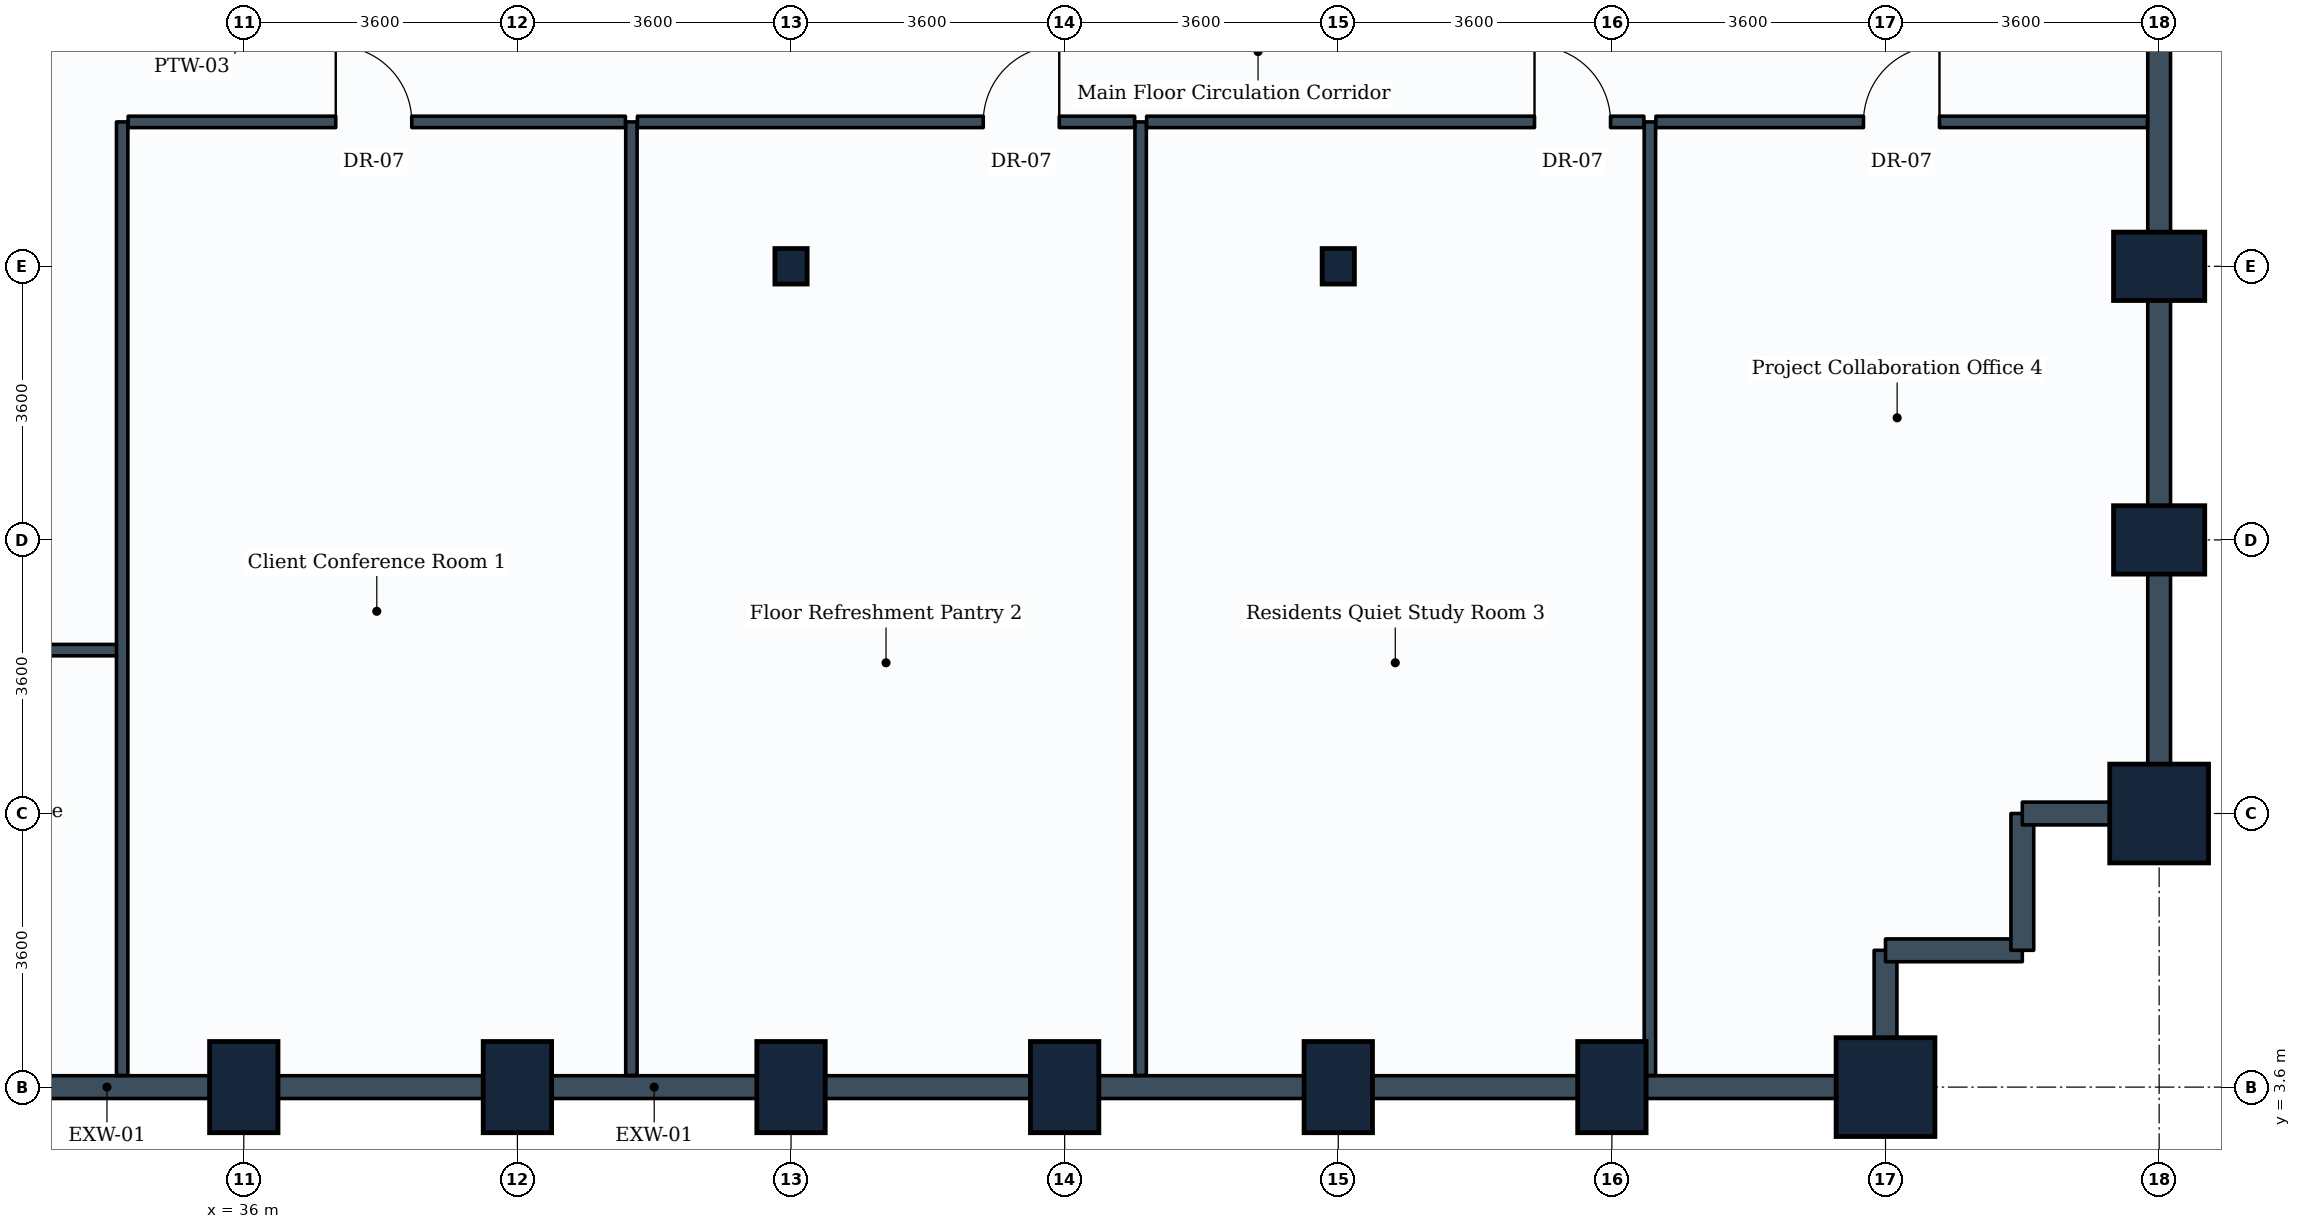
"""IFC4 building model, lengths in metres.
Left out: names, types, materials, properties, quantities, classifications, styles, units other than length and angle.
Written with IfcOpenShell. Run it as: python <this file> out.ifc"""

import sys

from ifc_helpers import new_model, si_unit, direction, frame, frame_2d, origin, origin_2d, place, context, subcontext, project, spatial, rectangle, i_section, extrude, element, fill, save


model = new_model("IFC4")
c1 = context("Model", 3, precision=1e-05, world=origin(), true_north=direction((0.0, 1.0)))
c2 = subcontext(c1, "Body", "Model", "MODEL_VIEW")
j1 = project(units=[si_unit("LENGTHUNIT", "METRE"), si_unit("PLANEANGLEUNIT", "RADIAN")], contexts=[c1])
p1 = place(None, origin())
s1 = spatial("IfcSite", under=j1, at=p1, CompositionType="ELEMENT")
p2 = place(p1, origin())
s2 = spatial("IfcBuilding", under=s1, at=p2, CompositionType="ELEMENT")
p3 = place(p2, frame((0.0, 0.0, 43.5)))
s3 = spatial("IfcBuildingStorey", under=s2, at=p3, CompositionType="ELEMENT", Elevation=43.5)
for number, where, z_axis, x_axis in (
    (1, (36.0, 3.6, 0.0), (0.0, 0.0, 1.0), (1.0, 0.0, 0.0)),
    (2, (39.6, 3.6, 0.0), (0.0, 0.0, 1.0), (1.0, 0.0, 0.0)),
    (3, (43.2, 3.6, 0.0), (0.0, 0.0, 1.0), (1.0, 0.0, 0.0)),
):
    element("IfcColumn", number, at=place(p3, frame(where, z_axis=z_axis, x_axis=x_axis)), inside=s3, PredefinedType="COLUMN", context=c2, shape_type="SweptSolid", body=[
        extrude(rectangle(XDim=0.9, YDim=1.2, at=origin_2d()), origin(), (0.0, 0.0, 1.0), 3.9),
    ])
p4 = place(p3, frame((43.2, 14.4, 0.0), z_axis=(0.0, 0.0, 1.0), x_axis=(1.0, 0.0, 0.0)))
e4 = element("IfcColumn", 4, at=p4, inside=s3, PredefinedType="COLUMN", context=c2, shape_type="SweptSolid", body=[
    extrude(i_section(OverallWidth=0.424, OverallDepth=0.467, WebThickness=0.033, FlangeThickness=0.053, FilletRadius=0.015, at=origin_2d()), origin(), (0.0, 0.0, 1.0), 3.9),
])
for number, where, z_axis, x_axis in (
    (5, (46.8, 3.6, 0.0), (0.0, 0.0, 1.0), (1.0, 0.0, 0.0)),
    (6, (50.4, 3.6, 0.0), (0.0, 0.0, 1.0), (1.0, 0.0, 0.0)),
):
    element("IfcColumn", number, at=place(p3, frame(where, z_axis=z_axis, x_axis=x_axis)), inside=s3, PredefinedType="COLUMN", context=c2, shape_type="SweptSolid", body=[
        extrude(rectangle(XDim=0.9, YDim=1.2, at=origin_2d()), origin(), (0.0, 0.0, 1.0), 3.9),
    ])
p5 = place(p3, frame((50.4, 14.4, 0.0), z_axis=(0.0, 0.0, 1.0), x_axis=(1.0, 0.0, 0.0)))
e7 = element("IfcColumn", 7, at=p5, inside=s3, PredefinedType="COLUMN", context=c2, shape_type="SweptSolid", body=[
    extrude(i_section(OverallWidth=0.424, OverallDepth=0.467, WebThickness=0.033, FlangeThickness=0.053, FilletRadius=0.015, at=origin_2d()), origin(), (0.0, 0.0, 1.0), 3.9),
])
p6 = place(p3, frame((54.0, 3.6, 0.0), z_axis=(0.0, 0.0, 1.0), x_axis=(1.0, 0.0, 0.0)))
e8 = element("IfcColumn", 8, at=p6, inside=s3, PredefinedType="COLUMN", context=c2, shape_type="SweptSolid", body=[
    extrude(rectangle(XDim=0.9, YDim=1.2, at=origin_2d()), origin(), (0.0, 0.0, 1.0), 3.9),
])
for number, where, z_axis, x_axis in (
    (9, (57.6, 3.6, 0.0), (0.0, 0.0, 1.0), (1.0, 0.0, 0.0)),
    (10, (61.2, 7.2, 0.0), (0.0, 0.0, 1.0), (1.0, 0.0, 0.0)),
):
    element("IfcColumn", number, at=place(p3, frame(where, z_axis=z_axis, x_axis=x_axis)), inside=s3, PredefinedType="COLUMN", context=c2, shape_type="SweptSolid", body=[
        extrude(rectangle(XDim=1.3, YDim=1.3, at=origin_2d()), origin(), (0.0, 0.0, 1.0), 3.9),
    ])
for number, where, z_axis, x_axis in (
    (11, (61.2, 10.8, 0.0), (0.0, 0.0, 1.0), (0.0, 1.0, 0.0)),
    (12, (61.2, 14.4, 0.0), (0.0, 0.0, 1.0), (0.0, 1.0, 0.0)),
):
    element("IfcColumn", number, at=place(p3, frame(where, z_axis=z_axis, x_axis=x_axis)), inside=s3, PredefinedType="COLUMN", context=c2, shape_type="SweptSolid", body=[
        extrude(rectangle(XDim=0.9, YDim=1.2, at=origin_2d()), origin(), (0.0, 0.0, 1.0), 3.9),
    ])
for number, where, z_axis, x_axis in (
    (13, (36.0, 3.6, 0.0), (0.0, 0.0, 1.0), (-1.0, 0.0, 0.0)),
    (14, (39.6, 3.6, 0.0), (0.0, 0.0, 1.0), (-1.0, 0.0, 0.0)),
):
    element("IfcWall", number, at=place(p3, frame(where, z_axis=z_axis, x_axis=x_axis)), inside=s3, PredefinedType="STANDARD", context=c2, shape_type="SweptSolid", body=[
        extrude(rectangle(XDim=3.6, YDim=0.3, at=frame_2d((1.8, 0.0))), origin(), (0.0, 0.0, 1.0), 2.93),
    ])
p7 = place(p3, frame((43.2, 3.6, 0.0), z_axis=(0.0, 0.0, 1.0), x_axis=(-1.0, 0.0, 0.0)))
e15 = element("IfcWall", 15, at=p7, inside=s3, PredefinedType="STANDARD", context=c2, shape_type="SweptSolid", body=[
    extrude(rectangle(XDim=3.6, YDim=0.3, at=frame_2d((1.8, 0.0))), origin(), (0.0, 0.0, 1.0), 2.93),
])
p8 = place(p3, frame((46.8, 3.6, 0.0), z_axis=(0.0, 0.0, 1.0), x_axis=(-1.0, 0.0, 0.0)))
e16 = element("IfcWall", 16, at=p8, inside=s3, PredefinedType="STANDARD", context=c2, shape_type="SweptSolid", body=[
    extrude(rectangle(XDim=3.6, YDim=0.3, at=frame_2d((1.8, 0.0))), origin(), (0.0, 0.0, 1.0), 2.93),
])
p9 = place(p3, frame((50.4, 3.6, 0.0), z_axis=(0.0, 0.0, 1.0), x_axis=(-1.0, 0.0, 0.0)))
e17 = element("IfcWall", 17, at=p9, inside=s3, PredefinedType="STANDARD", context=c2, shape_type="SweptSolid", body=[
    extrude(rectangle(XDim=3.6, YDim=0.3, at=frame_2d((1.8, 0.0))), origin(), (0.0, 0.0, 1.0), 2.93),
])
for number, where, z_axis, x_axis in (
    (18, (54.0, 3.6, 0.0), (0.0, 0.0, 1.0), (-1.0, 0.0, 0.0)),
    (19, (57.6, 3.6, 0.0), (0.0, 0.0, 1.0), (-1.0, 0.0, 0.0)),
):
    element("IfcWall", number, at=place(p3, frame(where, z_axis=z_axis, x_axis=x_axis)), inside=s3, PredefinedType="STANDARD", context=c2, shape_type="SweptSolid", body=[
        extrude(rectangle(XDim=3.6, YDim=0.3, at=frame_2d((1.8, 0.0))), origin(), (0.0, 0.0, 1.0), 2.93),
    ])
p10 = place(p3, frame((57.6, 5.4, 0.0), z_axis=(0.0, 0.0, 1.0), x_axis=(0.0, -1.0, 0.0)))
e20 = element("IfcWall", 20, at=p10, inside=s3, PredefinedType="STANDARD", context=c2, shape_type="SweptSolid", body=[
    extrude(rectangle(XDim=1.8, YDim=0.3, at=frame_2d((0.9, 0.0))), origin(), (0.0, 0.0, 1.0), 2.93),
])
p11 = place(p3, frame((59.4, 5.4, 0.0), z_axis=(0.0, 0.0, 1.0), x_axis=(-1.0, 0.0, 0.0)))
e21 = element("IfcWall", 21, at=p11, inside=s3, PredefinedType="STANDARD", context=c2, shape_type="SweptSolid", body=[
    extrude(rectangle(XDim=1.8, YDim=0.3, at=frame_2d((0.9, 0.0))), origin(), (0.0, 0.0, 1.0), 3.635),
])
p12 = place(p3, frame((59.4, 7.2, 0.0), z_axis=(0.0, 0.0, 1.0), x_axis=(0.0, -1.0, 0.0)))
e22 = element("IfcWall", 22, at=p12, inside=s3, PredefinedType="STANDARD", context=c2, shape_type="SweptSolid", body=[
    extrude(rectangle(XDim=1.8, YDim=0.3, at=frame_2d((0.9, 0.0))), origin(), (0.0, 0.0, 1.0), 3.635),
])
p13 = place(p3, frame((61.2, 7.2, 0.0), z_axis=(0.0, 0.0, 1.0), x_axis=(-1.0, 0.0, 0.0)))
e23 = element("IfcWall", 23, at=p13, inside=s3, PredefinedType="STANDARD", context=c2, shape_type="SweptSolid", body=[
    extrude(rectangle(XDim=1.8, YDim=0.3, at=frame_2d((0.9, 0.0))), origin(), (0.0, 0.0, 1.0), 2.93),
])
p14 = place(p3, frame((61.2, 10.8, 0.0), z_axis=(0.0, 0.0, 1.0), x_axis=(0.0, -1.0, 0.0)))
e24 = element("IfcWall", 24, at=p14, inside=s3, PredefinedType="STANDARD", context=c2, shape_type="SweptSolid", body=[
    extrude(rectangle(XDim=3.6, YDim=0.3, at=frame_2d((1.8, 0.0))), origin(), (0.0, 0.0, 1.0), 2.93),
])
p15 = place(p3, frame((61.2, 14.4, 0.0), z_axis=(0.0, 0.0, 1.0), x_axis=(0.0, -1.0, 0.0)))
e25 = element("IfcWall", 25, at=p15, inside=s3, PredefinedType="STANDARD", context=c2, shape_type="SweptSolid", body=[
    extrude(rectangle(XDim=3.6, YDim=0.3, at=frame_2d((1.8, 0.0))), origin(), (0.0, 0.0, 1.0), 2.93),
])
p16 = place(p3, frame((61.2, 18.0, 0.0), z_axis=(0.0, 0.0, 1.0), x_axis=(0.0, -1.0, 0.0)))
e26 = element("IfcWall", 26, at=p16, inside=s3, PredefinedType="STANDARD", context=c2, shape_type="SweptSolid", body=[
    extrude(rectangle(XDim=3.6, YDim=0.3, at=frame_2d((1.8, 0.0))), origin(), (0.0, 0.0, 1.0), 2.93),
])
p17 = place(p3, frame((28.879, 9.35, 0.0), z_axis=(0.0, 0.0, 1.0), x_axis=(1.0, 0.0, 0.0)))
e27 = element("IfcWall", 27, at=p17, inside=s3, PredefinedType="PARTITIONING", context=c2, shape_type="SweptSolid", body=[
    extrude(rectangle(XDim=5.521, YDim=0.15, at=frame_2d((2.76, 0.0))), origin(), (0.0, 0.0, 1.0), 3.635),
])
p18 = place(p17, frame((0.36, 0.0, 0.0)))
e28 = element("IfcOpeningElement", 28, at=p18, cuts=e27, PredefinedType="OPENING", context=c2, shape_type="SweptSolid", body=[
    extrude(rectangle(XDim=1.0, YDim=2.1, at=frame_2d((0.5, 1.05))), frame((0.0, 0.085, 0.0), z_axis=(0.0, -1.0, 0.0), x_axis=(1.0, 0.0, 0.0)), (0.0, 0.0, 1.0), 0.17),
])
for number, where, z_axis, x_axis in (
    (29, (34.4, 3.754, 0.0), (0.0, 0.0, 1.0), (0.0, 1.0, 0.0)),
    (30, (41.1, 3.754, 0.0), (0.0, 0.0, 1.0), (0.0, 1.0, 0.0)),
):
    element("IfcWall", number, at=place(p3, frame(where, z_axis=z_axis, x_axis=x_axis)), inside=s3, PredefinedType="PARTITIONING", context=c2, shape_type="SweptSolid", body=[
        extrude(rectangle(XDim=12.546, YDim=0.15, at=frame_2d((6.273, 0.0))), origin(), (0.0, 0.0, 1.0), 2.93),
    ])
p19 = place(p3, frame((34.479, 16.3, 0.0), z_axis=(0.0, 0.0, 1.0), x_axis=(1.0, 0.0, 0.0)))
e31 = element("IfcWall", 31, at=p19, inside=s3, PredefinedType="PARTITIONING", context=c2, shape_type="SweptSolid", body=[
    extrude(rectangle(XDim=6.542, YDim=0.15, at=frame_2d((3.271, 0.0))), origin(), (0.0, 0.0, 1.0), 3.04),
])
p20 = place(p19, frame((2.731, 0.0, 0.0)))
e32 = element("IfcOpeningElement", 32, at=p20, cuts=e31, PredefinedType="OPENING", context=c2, shape_type="SweptSolid", body=[
    extrude(rectangle(XDim=1.0, YDim=2.1, at=frame_2d((0.5, 1.05))), frame((0.0, 0.085, 0.0), z_axis=(0.0, -1.0, 0.0), x_axis=(1.0, 0.0, 0.0)), (0.0, 0.0, 1.0), 0.17),
])
p21 = place(p3, frame((47.8, 3.754, 0.0), z_axis=(0.0, 0.0, 1.0), x_axis=(0.0, 1.0, 0.0)))
e33 = element("IfcWall", 33, at=p21, inside=s3, PredefinedType="PARTITIONING", context=c2, shape_type="SweptSolid", body=[
    extrude(rectangle(XDim=12.546, YDim=0.15, at=frame_2d((6.273, 0.0))), origin(), (0.0, 0.0, 1.0), 2.93),
])
p22 = place(p3, frame((41.179, 16.3, 0.0), z_axis=(0.0, 0.0, 1.0), x_axis=(1.0, 0.0, 0.0)))
e34 = element("IfcWall", 34, at=p22, inside=s3, PredefinedType="PARTITIONING", context=c2, shape_type="SweptSolid", body=[
    extrude(rectangle(XDim=6.542, YDim=0.15, at=frame_2d((3.271, 0.0))), origin(), (0.0, 0.0, 1.0), 3.04),
])
p23 = place(p22, frame((4.55, 0.0, 0.0)))
e35 = element("IfcOpeningElement", 35, at=p23, cuts=e34, PredefinedType="OPENING", context=c2, shape_type="SweptSolid", body=[
    extrude(rectangle(XDim=1.0, YDim=2.1, at=frame_2d((0.5, 1.05))), frame((0.0, 0.085, 0.0), z_axis=(0.0, -1.0, 0.0), x_axis=(1.0, 0.0, 0.0)), (0.0, 0.0, 1.0), 0.17),
])
p24 = place(p3, frame((54.5, 3.754, 0.0), z_axis=(0.0, 0.0, 1.0), x_axis=(0.0, 1.0, 0.0)))
e36 = element("IfcWall", 36, at=p24, inside=s3, PredefinedType="PARTITIONING", context=c2, shape_type="SweptSolid", body=[
    extrude(rectangle(XDim=12.546, YDim=0.15, at=frame_2d((6.273, 0.0))), origin(), (0.0, 0.0, 1.0), 2.93),
])
p25 = place(p3, frame((47.879, 16.3, 0.0), z_axis=(0.0, 0.0, 1.0), x_axis=(1.0, 0.0, 0.0)))
e37 = element("IfcWall", 37, at=p25, inside=s3, PredefinedType="PARTITIONING", context=c2, shape_type="SweptSolid", body=[
    extrude(rectangle(XDim=6.542, YDim=0.15, at=frame_2d((3.271, 0.0))), origin(), (0.0, 0.0, 1.0), 3.04),
])
p26 = place(p25, frame((5.103, 0.0, 0.0)))
e38 = element("IfcOpeningElement", 38, at=p26, cuts=e37, PredefinedType="OPENING", context=c2, shape_type="SweptSolid", body=[
    extrude(rectangle(XDim=1.0, YDim=2.1, at=frame_2d((0.5, 1.05))), frame((0.0, 0.085, 0.0), z_axis=(0.0, -1.0, 0.0), x_axis=(1.0, 0.0, 0.0)), (0.0, 0.0, 1.0), 0.17),
])
p27 = place(p3, frame((54.579, 16.3, 0.0), z_axis=(0.0, 0.0, 1.0), x_axis=(1.0, 0.0, 0.0)))
e39 = element("IfcWall", 39, at=p27, inside=s3, PredefinedType="PARTITIONING", context=c2, shape_type="SweptSolid", body=[
    extrude(rectangle(XDim=6.467, YDim=0.15, at=frame_2d((3.233, 0.0))), origin(), (0.0, 0.0, 1.0), 2.93),
])
p28 = place(p27, frame((2.731, 0.0, 0.0)))
e40 = element("IfcOpeningElement", 40, at=p28, cuts=e39, PredefinedType="OPENING", context=c2, shape_type="SweptSolid", body=[
    extrude(rectangle(XDim=1.0, YDim=2.1, at=frame_2d((0.5, 1.05))), frame((0.0, 0.085, 0.0), z_axis=(0.0, -1.0, 0.0), x_axis=(1.0, 0.0, 0.0)), (0.0, 0.0, 1.0), 0.17),
])
p29 = place(p20, origin())
e41 = element("IfcDoor", 41, at=p29, inside=s3, OperationType="SINGLE_SWING_LEFT", PredefinedType="DOOR", context=c2, shape_type="SweptSolid", body=[
    extrude(rectangle(XDim=1.0, YDim=2.1, at=frame_2d((0.5, 1.05))), frame((0.0, 0.025, 0.0), z_axis=(0.0, -1.0, 0.0), x_axis=(1.0, 0.0, 0.0)), (0.0, 0.0, 1.0), 0.05),
])
fill(e32, e41)
p30 = place(p23, origin())
e42 = element("IfcDoor", 42, at=p30, inside=s3, OperationType="SINGLE_SWING_RIGHT", PredefinedType="DOOR", context=c2, shape_type="SweptSolid", body=[
    extrude(rectangle(XDim=1.0, YDim=2.1, at=frame_2d((0.5, 1.05))), frame((0.0, 0.025, 0.0), z_axis=(0.0, -1.0, 0.0), x_axis=(1.0, 0.0, 0.0)), (0.0, 0.0, 1.0), 0.05),
])
fill(e35, e42)
p31 = place(p26, origin())
e43 = element("IfcDoor", 43, at=p31, inside=s3, OperationType="SINGLE_SWING_LEFT", PredefinedType="DOOR", context=c2, shape_type="SweptSolid", body=[
    extrude(rectangle(XDim=1.0, YDim=2.1, at=frame_2d((0.5, 1.05))), frame((0.0, 0.025, 0.0), z_axis=(0.0, -1.0, 0.0), x_axis=(1.0, 0.0, 0.0)), (0.0, 0.0, 1.0), 0.05),
])
fill(e38, e43)
p32 = place(p28, origin())
e44 = element("IfcDoor", 44, at=p32, inside=s3, OperationType="SINGLE_SWING_RIGHT", PredefinedType="DOOR", context=c2, shape_type="SweptSolid", body=[
    extrude(rectangle(XDim=1.0, YDim=2.1, at=frame_2d((0.5, 1.05))), frame((0.0, 0.025, 0.0), z_axis=(0.0, -1.0, 0.0), x_axis=(1.0, 0.0, 0.0)), (0.0, 0.0, 1.0), 0.05),
])
fill(e40, e44)
save(model, sys.argv[1])
